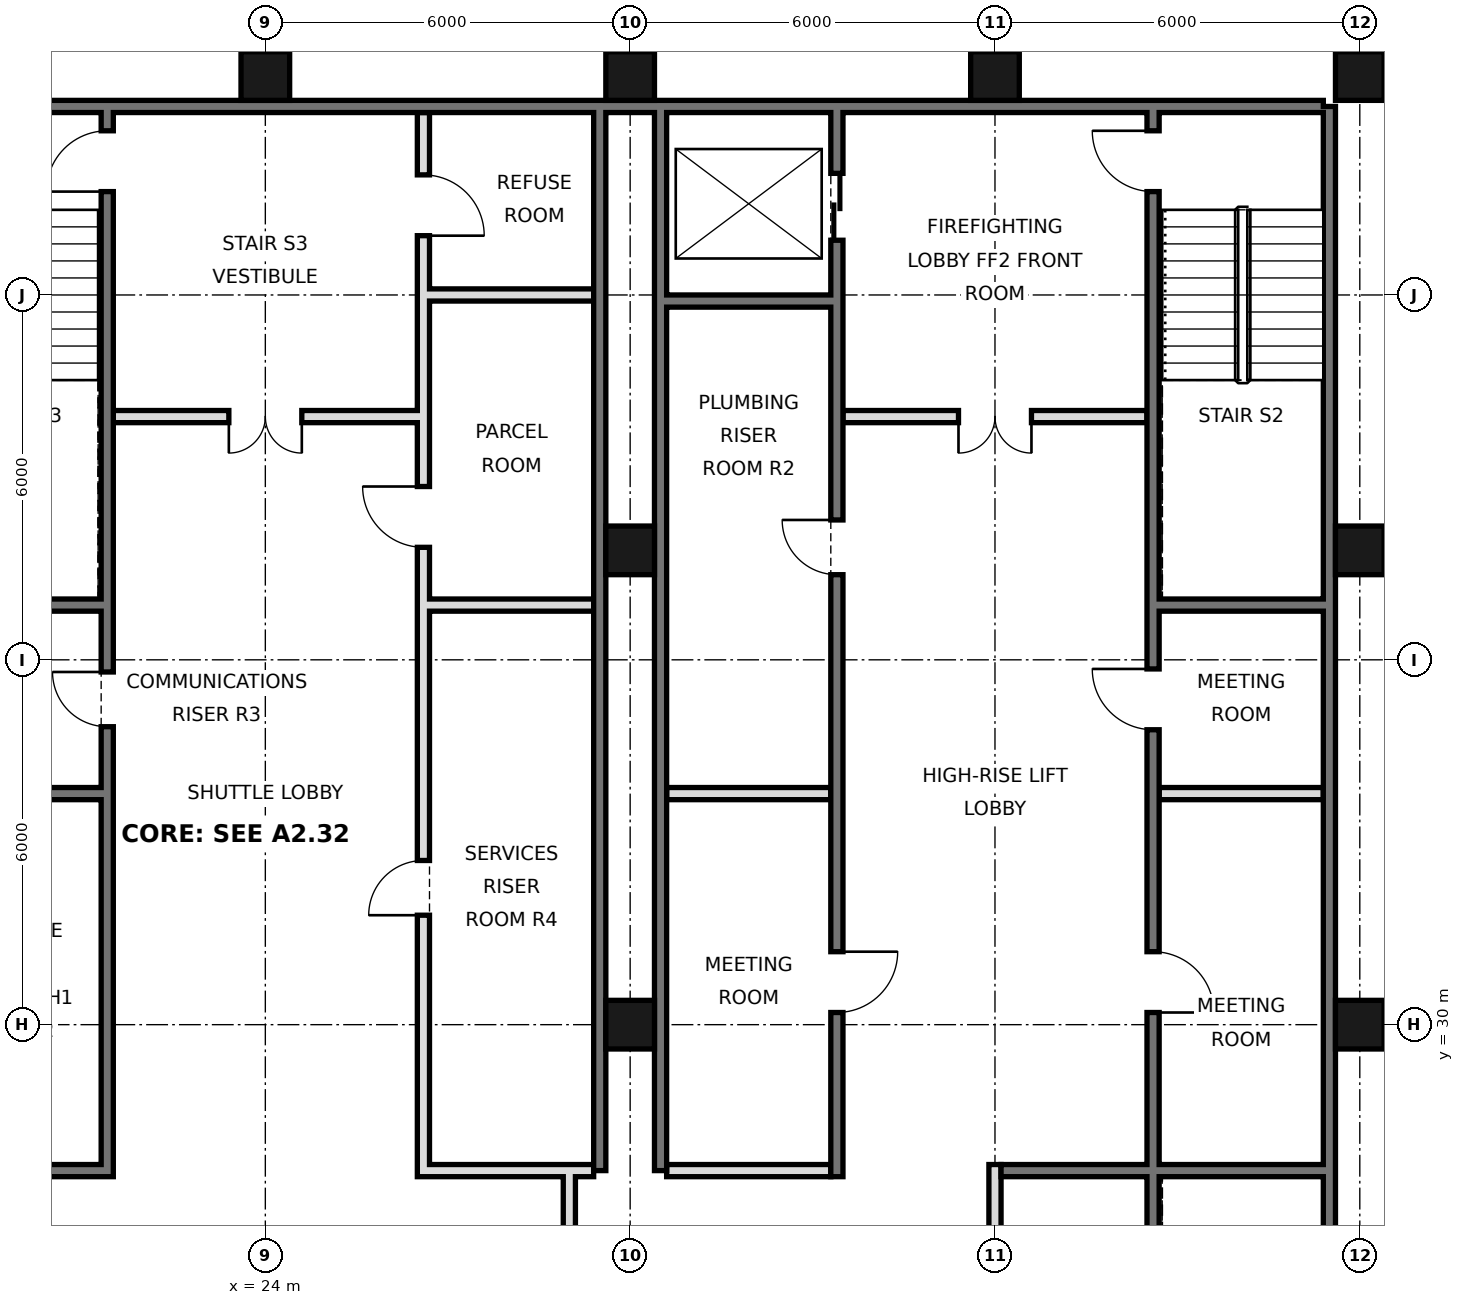
"""IFC4 building model, lengths in metres.
Left out: names, types, materials, properties, quantities, classifications, styles, units other than length and angle.
Written with IfcOpenShell. Run it as: python <this file> out.ifc"""

import sys

from ifc_helpers import new_model, si_unit, direction, frame, frame_2d, origin, origin_2d, place, context, subcontext, project, spatial, rectangle, hollow_rectangle, extrude, element, fill, save


model = new_model("IFC4")
c1 = context("Model", 3, precision=1e-05, world=origin(), true_north=direction((0.0, 1.0)))
c2 = subcontext(c1, "Body", "Model", "MODEL_VIEW")
j1 = project(units=[si_unit("LENGTHUNIT", "METRE"), si_unit("PLANEANGLEUNIT", "RADIAN")], contexts=[c1])
p1 = place(None, origin())
s1 = spatial("IfcSite", under=j1, at=p1, CompositionType="ELEMENT")
p2 = place(p1, origin())
s2 = spatial("IfcBuilding", under=s1, at=p2, CompositionType="ELEMENT")
p3 = place(p2, frame((0.0, 0.0, 126.8)))
s3 = spatial("IfcBuildingStorey", under=s2, at=p3, CompositionType="ELEMENT", Elevation=126.8)
for number, where, z_axis, x_axis in (
    (1, (24.0, 45.6, 0.0), (0.0, 0.0, 1.0), (1.0, 0.0, 0.0)),
    (2, (30.0, 30.0, 0.0), (0.0, 0.0, 1.0), (1.0, 0.0, 0.0)),
    (3, (30.0, 37.8, 0.0), (0.0, 0.0, 1.0), (1.0, 0.0, 0.0)),
    (4, (30.0, 45.6, 0.0), (0.0, 0.0, 1.0), (1.0, 0.0, 0.0)),
    (5, (36.0, 45.6, 0.0), (0.0, 0.0, 1.0), (1.0, 0.0, 0.0)),
    (6, (42.0, 30.0, 0.0), (0.0, 0.0, 1.0), (1.0, 0.0, 0.0)),
    (7, (42.0, 37.8, 0.0), (0.0, 0.0, 1.0), (1.0, 0.0, 0.0)),
    (8, (42.0, 45.6, 0.0), (0.0, 0.0, 1.0), (1.0, 0.0, 0.0)),
):
    element("IfcColumn", number, at=place(p3, frame(where, z_axis=z_axis, x_axis=x_axis)), inside=s3, PredefinedType="COLUMN", context=c2, shape_type="SweptSolid", body=[
        extrude(hollow_rectangle(XDim=0.8, YDim=0.8, WallThickness=0.05, at=origin_2d()), origin(), (0.0, 0.0, 1.0), 3.6),
    ])
p4 = place(p3, frame((41.5, 21.6, 0.0), z_axis=(0.0, 0.0, 1.0), x_axis=(0.0, 1.0, 0.0)))
e9 = element("IfcWall", 9, at=p4, inside=s3, PredefinedType="SOLIDWALL", context=c2, shape_type="SweptSolid", body=[
    extrude(rectangle(XDim=23.5, YDim=0.2, at=frame_2d((11.75, 0.0))), origin(), (0.0, 0.0, 1.0), 3.42),
])
p5 = place(p3, frame((6.6, 45.1, 0.0), z_axis=(0.0, 0.0, 1.0), x_axis=(1.0, 0.0, 0.0)))
e10 = element("IfcWall", 10, at=p5, inside=s3, PredefinedType="SOLIDWALL", context=c2, shape_type="SweptSolid", body=[
    extrude(rectangle(XDim=34.8, YDim=0.2, at=frame_2d((17.4, 0.0))), origin(), (0.0, 0.0, 1.0), 3.42),
])
for number, where, z_axis, x_axis in (
    (11, (29.5, 27.6, 0.0), (0.0, 0.0, 1.0), (0.0, 1.0, 0.0)),
    (12, (30.5, 27.6, 0.0), (0.0, 0.0, 1.0), (0.0, 1.0, 0.0)),
):
    element("IfcWall", number, at=place(p3, frame(where, z_axis=z_axis, x_axis=x_axis)), inside=s3, PredefinedType="SOLIDWALL", context=c2, shape_type="SweptSolid", body=[
        extrude(rectangle(XDim=17.5, YDim=0.2, at=frame_2d((8.75, 0.0))), origin(), (0.0, 0.0, 1.0), 3.42),
    ])
p6 = place(p3, frame((29.0, 21.6, 0.0), z_axis=(0.0, 0.0, 1.0), x_axis=(0.0, 1.0, 0.0)))
e13 = element("IfcWall", 13, at=p6, inside=s3, PredefinedType="PARTITIONING", context=c2, shape_type="SweptSolid", body=[
    extrude(rectangle(XDim=6.0, YDim=0.2, at=frame_2d((3.0, 0.0))), origin(), (0.0, 0.0, 1.0), 3.42),
])
p7 = place(p6, frame((2.1, 0.0, 0.0)))
e14 = element("IfcOpeningElement", 14, at=p7, cuts=e13, PredefinedType="OPENING", context=c2, shape_type="SweptSolid", body=[
    extrude(rectangle(XDim=1.8, YDim=2.1, at=frame_2d((0.9, 1.05))), frame((0.0, 0.11, 0.0), z_axis=(0.0, -1.0, 0.0), x_axis=(1.0, 0.0, 0.0)), (0.0, 0.0, 1.0), 0.22),
])
p8 = place(p3, frame((21.4, 27.5, 0.0), z_axis=(0.0, 0.0, 1.0), x_axis=(0.0, 1.0, 0.0)))
e15 = element("IfcWall", 15, at=p8, inside=s3, PredefinedType="SOLIDWALL", context=c2, shape_type="SweptSolid", body=[
    extrude(rectangle(XDim=17.5, YDim=0.2, at=frame_2d((8.75, 0.0))), origin(), (0.0, 0.0, 1.0), 3.42),
])
p9 = place(p8, frame((16.2, 0.0, 0.0)))
e16 = element("IfcOpeningElement", 16, at=p9, cuts=e15, PredefinedType="OPENING", context=c2, shape_type="SweptSolid", body=[
    extrude(rectangle(XDim=1.0, YDim=2.1, at=frame_2d((0.5, 1.05))), frame((0.0, 0.11, 0.0), z_axis=(0.0, -1.0, 0.0), x_axis=(1.0, 0.0, 0.0)), (0.0, 0.0, 1.0), 0.22),
])
p10 = place(p8, frame((7.4, 0.0, 0.0)))
e17 = element("IfcOpeningElement", 17, at=p10, cuts=e15, PredefinedType="OPENING", context=c2, shape_type="SweptSolid", body=[
    extrude(rectangle(XDim=0.9, YDim=2.1, at=frame_2d((0.45, 1.05))), frame((0.0, 0.11, 0.0), z_axis=(0.0, -1.0, 0.0), x_axis=(1.0, 0.0, 0.0)), (0.0, 0.0, 1.0), 0.22),
])
p11 = place(p3, frame((26.6, 27.5, 0.0), z_axis=(0.0, 0.0, 1.0), x_axis=(0.0, 1.0, 0.0)))
e18 = element("IfcWall", 18, at=p11, inside=s3, PredefinedType="SOLIDWALL", context=c2, shape_type="SweptSolid", body=[
    extrude(rectangle(XDim=17.5, YDim=0.2, at=frame_2d((8.75, 0.0))), origin(), (0.0, 0.0, 1.0), 3.42),
])
p12 = place(p11, frame((4.3, 0.0, 0.0)))
e19 = element("IfcOpeningElement", 19, at=p12, cuts=e18, PredefinedType="OPENING", context=c2, shape_type="SweptSolid", body=[
    extrude(rectangle(XDim=0.9, YDim=2.1, at=frame_2d((0.45, 1.05))), frame((0.0, 0.11, 0.0), z_axis=(0.0, -1.0, 0.0), x_axis=(1.0, 0.0, 0.0)), (0.0, 0.0, 1.0), 0.22),
])
p13 = place(p11, frame((10.35, 0.0, 0.0)))
e20 = element("IfcOpeningElement", 20, at=p13, cuts=e18, PredefinedType="OPENING", context=c2, shape_type="SweptSolid", body=[
    extrude(rectangle(XDim=1.0, YDim=2.1, at=frame_2d((0.5, 1.05))), frame((0.0, 0.11, 0.0), z_axis=(0.0, -1.0, 0.0), x_axis=(1.0, 0.0, 0.0)), (0.0, 0.0, 1.0), 0.22),
])
p14 = place(p11, frame((15.475, 0.0, 0.0)))
e21 = element("IfcOpeningElement", 21, at=p14, cuts=e18, PredefinedType="OPENING", context=c2, shape_type="SweptSolid", body=[
    extrude(rectangle(XDim=1.0, YDim=2.1, at=frame_2d((0.5, 1.05))), frame((0.0, 0.11, 0.0), z_axis=(0.0, -1.0, 0.0), x_axis=(1.0, 0.0, 0.0)), (0.0, 0.0, 1.0), 0.22),
])
p15 = place(p3, frame((33.4, 27.5, 0.0), z_axis=(0.0, 0.0, 1.0), x_axis=(0.0, 1.0, 0.0)))
e22 = element("IfcWall", 22, at=p15, inside=s3, PredefinedType="SOLIDWALL", context=c2, shape_type="SweptSolid", body=[
    extrude(rectangle(XDim=17.5, YDim=0.2, at=frame_2d((8.75, 0.0))), origin(), (0.0, 0.0, 1.0), 3.42),
])
p16 = place(p15, frame((15.4, 0.0, 0.0)))
e23 = element("IfcOpeningElement", 23, at=p16, cuts=e22, PredefinedType="OPENING", context=c2, shape_type="SweptSolid", body=[
    extrude(rectangle(XDim=1.1, YDim=2.1, at=frame_2d((0.55, 1.05))), frame((0.0, 0.11, 0.0), z_axis=(0.0, -1.0, 0.0), x_axis=(1.0, 0.0, 0.0)), (0.0, 0.0, 1.0), 0.22),
])
p17 = place(p15, frame((2.7, 0.0, 0.0)))
e24 = element("IfcOpeningElement", 24, at=p17, cuts=e22, PredefinedType="OPENING", context=c2, shape_type="SweptSolid", body=[
    extrude(rectangle(XDim=1.0, YDim=2.1, at=frame_2d((0.5, 1.05))), frame((0.0, 0.11, 0.0), z_axis=(0.0, -1.0, 0.0), x_axis=(1.0, 0.0, 0.0)), (0.0, 0.0, 1.0), 0.22),
])
p18 = place(p15, frame((9.9, 0.0, 0.0)))
e25 = element("IfcOpeningElement", 25, at=p18, cuts=e22, PredefinedType="OPENING", context=c2, shape_type="SweptSolid", body=[
    extrude(rectangle(XDim=0.9, YDim=2.1, at=frame_2d((0.45, 1.05))), frame((0.0, 0.11, 0.0), z_axis=(0.0, -1.0, 0.0), x_axis=(1.0, 0.0, 0.0)), (0.0, 0.0, 1.0), 0.22),
])
p19 = place(p3, frame((36.0, 21.6, 0.0), z_axis=(0.0, 0.0, 1.0), x_axis=(0.0, 1.0, 0.0)))
e26 = element("IfcWall", 26, at=p19, inside=s3, PredefinedType="PARTITIONING", context=c2, shape_type="SweptSolid", body=[
    extrude(rectangle(XDim=6.1, YDim=0.2, at=frame_2d((3.05, 0.0))), origin(), (0.0, 0.0, 1.0), 3.42),
])
p20 = place(p3, frame((38.6, 21.6, 0.0), z_axis=(0.0, 0.0, 1.0), x_axis=(0.0, 1.0, 0.0)))
e27 = element("IfcWall", 27, at=p20, inside=s3, PredefinedType="SOLIDWALL", context=c2, shape_type="SweptSolid", body=[
    extrude(rectangle(XDim=23.4, YDim=0.2, at=frame_2d((11.7, 0.0))), origin(), (0.0, 0.0, 1.0), 3.42),
])
p21 = place(p20, frame((8.6, 0.0, 0.0)))
e28 = element("IfcOpeningElement", 28, at=p21, cuts=e27, PredefinedType="OPENING", context=c2, shape_type="SweptSolid", body=[
    extrude(rectangle(XDim=1.0, YDim=2.1, at=frame_2d((0.5, 1.05))), frame((0.0, 0.11, 0.0), z_axis=(0.0, -1.0, 0.0), x_axis=(1.0, 0.0, 0.0)), (0.0, 0.0, 1.0), 0.22),
])
p22 = place(p20, frame((13.25, 0.0, 0.0)))
e29 = element("IfcOpeningElement", 29, at=p22, cuts=e27, PredefinedType="OPENING", context=c2, shape_type="SweptSolid", body=[
    extrude(rectangle(XDim=1.0, YDim=2.1, at=frame_2d((0.5, 1.05))), frame((0.0, 0.11, 0.0), z_axis=(0.0, -1.0, 0.0), x_axis=(1.0, 0.0, 0.0)), (0.0, 0.0, 1.0), 0.22),
])
p23 = place(p20, frame((22.1, 0.0, 0.0)))
e30 = element("IfcOpeningElement", 30, at=p23, cuts=e27, PredefinedType="OPENING", context=c2, shape_type="SweptSolid", body=[
    extrude(rectangle(XDim=1.0, YDim=2.1, at=frame_2d((0.5, 1.05))), frame((0.0, 0.11, 0.0), z_axis=(0.0, -1.0, 0.0), x_axis=(1.0, 0.0, 0.0)), (0.0, 0.0, 1.0), 0.22),
])
p24 = place(p20, frame((0.175, 0.0, 0.0)))
e31 = element("IfcOpeningElement", 31, at=p24, cuts=e27, PredefinedType="OPENING", context=c2, shape_type="SweptSolid", body=[
    extrude(rectangle(XDim=0.9, YDim=2.1, at=frame_2d((0.45, 1.05))), frame((0.0, 0.11, 0.0), z_axis=(0.0, -1.0, 0.0), x_axis=(1.0, 0.0, 0.0)), (0.0, 0.0, 1.0), 0.22),
])
for number, where, z_axis, x_axis in (
    (32, (18.6, 27.6, 0.0), (0.0, 0.0, 1.0), (1.0, 0.0, 0.0)),
    (33, (26.7, 27.6, 0.0), (0.0, 0.0, 1.0), (1.0, 0.0, 0.0)),
):
    element("IfcWall", number, at=place(p3, frame(where, z_axis=z_axis, x_axis=x_axis)), inside=s3, PredefinedType="SOLIDWALL", context=c2, shape_type="SweptSolid", body=[
        extrude(rectangle(XDim=2.7, YDim=0.2, at=frame_2d((1.35, 0.0))), origin(), (0.0, 0.0, 1.0), 3.42),
    ])
p25 = place(p3, frame((30.6, 27.6, 0.0), z_axis=(0.0, 0.0, 1.0), x_axis=(1.0, 0.0, 0.0)))
e34 = element("IfcWall", 34, at=p25, inside=s3, PredefinedType="PARTITIONING", context=c2, shape_type="SweptSolid", body=[
    extrude(rectangle(XDim=2.7, YDim=0.2, at=frame_2d((1.35, 0.0))), origin(), (0.0, 0.0, 1.0), 3.42),
])
p26 = place(p3, frame((36.1, 27.6, 0.0), z_axis=(0.0, 0.0, 1.0), x_axis=(1.0, 0.0, 0.0)))
e35 = element("IfcWall", 35, at=p26, inside=s3, PredefinedType="SOLIDWALL", context=c2, shape_type="SweptSolid", body=[
    extrude(rectangle(XDim=5.3, YDim=0.2, at=frame_2d((2.65, 0.0))), origin(), (0.0, 0.0, 1.0), 3.42),
])
for number, where, z_axis, x_axis in (
    (36, (18.6, 33.8, 0.0), (0.0, 0.0, 1.0), (1.0, 0.0, 0.0)),
    (37, (30.6, 33.8, 0.0), (0.0, 0.0, 1.0), (1.0, 0.0, 0.0)),
):
    element("IfcWall", number, at=place(p3, frame(where, z_axis=z_axis, x_axis=x_axis)), inside=s3, PredefinedType="SOLIDWALL", context=c2, shape_type="SweptSolid", body=[
        extrude(rectangle(XDim=2.7, YDim=0.2, at=frame_2d((1.35, 0.0))), origin(), (0.0, 0.0, 1.0), 3.42),
    ])
p27 = place(p3, frame((38.7, 33.8, 0.0), z_axis=(0.0, 0.0, 1.0), x_axis=(1.0, 0.0, 0.0)))
e38 = element("IfcWall", 38, at=p27, inside=s3, PredefinedType="PARTITIONING", context=c2, shape_type="SweptSolid", body=[
    extrude(rectangle(XDim=2.7, YDim=0.2, at=frame_2d((1.35, 0.0))), origin(), (0.0, 0.0, 1.0), 3.42),
])
for number, where, z_axis, x_axis in (
    (39, (18.6, 36.9, 0.0), (0.0, 0.0, 1.0), (1.0, 0.0, 0.0)),
    (40, (26.7, 36.9, 0.0), (0.0, 0.0, 1.0), (1.0, 0.0, 0.0)),
    (41, (38.7, 36.9, 0.0), (0.0, 0.0, 1.0), (1.0, 0.0, 0.0)),
):
    element("IfcWall", number, at=place(p3, frame(where, z_axis=z_axis, x_axis=x_axis)), inside=s3, PredefinedType="SOLIDWALL", context=c2, shape_type="SweptSolid", body=[
        extrude(rectangle(XDim=2.7, YDim=0.2, at=frame_2d((1.35, 0.0))), origin(), (0.0, 0.0, 1.0), 3.42),
    ])
p28 = place(p3, frame((21.5, 40.0, 0.0), z_axis=(0.0, 0.0, 1.0), x_axis=(1.0, 0.0, 0.0)))
e42 = element("IfcWall", 42, at=p28, inside=s3, PredefinedType="PARTITIONING", context=c2, shape_type="SweptSolid", body=[
    extrude(rectangle(XDim=5.0, YDim=0.2, at=frame_2d((2.5, 0.0))), origin(), (0.0, 0.0, 1.0), 3.42),
])
p29 = place(p28, frame((1.9, 0.0, 0.0)))
e43 = element("IfcOpeningElement", 43, at=p29, cuts=e42, PredefinedType="OPENING", context=c2, shape_type="SweptSolid", body=[
    extrude(rectangle(XDim=1.2, YDim=2.1, at=frame_2d((0.6, 1.05))), frame((0.0, 0.11, 0.0), z_axis=(0.0, -1.0, 0.0), x_axis=(1.0, 0.0, 0.0)), (0.0, 0.0, 1.0), 0.22),
])
p30 = place(p3, frame((33.5, 40.0, 0.0), z_axis=(0.0, 0.0, 1.0), x_axis=(1.0, 0.0, 0.0)))
e44 = element("IfcWall", 44, at=p30, inside=s3, PredefinedType="PARTITIONING", context=c2, shape_type="SweptSolid", body=[
    extrude(rectangle(XDim=5.0, YDim=0.2, at=frame_2d((2.5, 0.0))), origin(), (0.0, 0.0, 1.0), 3.42),
])
p31 = place(p30, frame((1.9, 0.0, 0.0)))
e45 = element("IfcOpeningElement", 45, at=p31, cuts=e44, PredefinedType="OPENING", context=c2, shape_type="SweptSolid", body=[
    extrude(rectangle(XDim=1.2, YDim=2.1, at=frame_2d((0.6, 1.05))), frame((0.0, 0.11, 0.0), z_axis=(0.0, -1.0, 0.0), x_axis=(1.0, 0.0, 0.0)), (0.0, 0.0, 1.0), 0.22),
])
p32 = place(p3, frame((30.6, 41.9, 0.0), z_axis=(0.0, 0.0, 1.0), x_axis=(1.0, 0.0, 0.0)))
e46 = element("IfcWall", 46, at=p32, inside=s3, PredefinedType="SOLIDWALL", context=c2, shape_type="SweptSolid", body=[
    extrude(rectangle(XDim=2.7, YDim=0.2, at=frame_2d((1.35, 0.0))), origin(), (0.0, 0.0, 1.0), 3.42),
])
p33 = place(p3, frame((26.7, 42.0, 0.0), z_axis=(0.0, 0.0, 1.0), x_axis=(1.0, 0.0, 0.0)))
e47 = element("IfcWall", 47, at=p33, inside=s3, PredefinedType="PARTITIONING", context=c2, shape_type="SweptSolid", body=[
    extrude(rectangle(XDim=2.7, YDim=0.2, at=frame_2d((1.35, 0.0))), origin(), (0.0, 0.0, 1.0), 3.42),
])
p34 = place(p29, frame((1.2, 0.0, 0.0), z_axis=(0.0, 0.0, 1.0), x_axis=(-1.0, 0.0, 0.0)))
e48 = element("IfcDoor", 48, at=p34, inside=s3, OperationType="DOUBLE_DOOR_SINGLE_SWING", PredefinedType="DOOR", context=c2, shape_type="SweptSolid", body=[
    extrude(rectangle(XDim=1.2, YDim=2.1, at=frame_2d((0.6, 1.05))), frame((0.0, 0.025, 0.0), z_axis=(0.0, -1.0, 0.0), x_axis=(1.0, 0.0, 0.0)), (0.0, 0.0, 1.0), 0.05),
])
fill(e43, e48)
p35 = place(p31, frame((1.2, 0.0, 0.0), z_axis=(0.0, 0.0, 1.0), x_axis=(-1.0, 0.0, 0.0)))
e49 = element("IfcDoor", 49, at=p35, inside=s3, OperationType="DOUBLE_DOOR_SINGLE_SWING", PredefinedType="DOOR", context=c2, shape_type="SweptSolid", body=[
    extrude(rectangle(XDim=1.2, YDim=2.1, at=frame_2d((0.6, 1.05))), frame((0.0, 0.025, 0.0), z_axis=(0.0, -1.0, 0.0), x_axis=(1.0, 0.0, 0.0)), (0.0, 0.0, 1.0), 0.05),
])
fill(e45, e49)
p36 = place(p16, origin())
e50 = element("IfcDoor", 50, at=p36, inside=s3, OperationType="DOUBLE_DOOR_SLIDING", PredefinedType="DOOR", context=c2, shape_type="SweptSolid", body=[
    extrude(rectangle(XDim=1.1, YDim=2.1, at=frame_2d((0.55, 1.05))), frame((0.0, 0.025, 0.0), z_axis=(0.0, -1.0, 0.0), x_axis=(1.0, 0.0, 0.0)), (0.0, 0.0, 1.0), 0.05),
])
fill(e23, e50)
p37 = place(p21, frame((1.0, 0.0, 0.0), z_axis=(0.0, 0.0, 1.0), x_axis=(-1.0, 0.0, 0.0)))
e51 = element("IfcDoor", 51, at=p37, inside=s3, OperationType="SINGLE_SWING_RIGHT", PredefinedType="DOOR", context=c2, shape_type="SweptSolid", body=[
    extrude(rectangle(XDim=1.0, YDim=2.1, at=frame_2d((0.5, 1.05))), frame((0.0, 0.025, 0.0), z_axis=(0.0, -1.0, 0.0), x_axis=(1.0, 0.0, 0.0)), (0.0, 0.0, 1.0), 0.05),
])
fill(e28, e51)
p38 = place(p22, frame((1.0, 0.0, 0.0), z_axis=(0.0, 0.0, 1.0), x_axis=(-1.0, 0.0, 0.0)))
e52 = element("IfcDoor", 52, at=p38, inside=s3, OperationType="SINGLE_SWING_LEFT", PredefinedType="DOOR", context=c2, shape_type="SweptSolid", body=[
    extrude(rectangle(XDim=1.0, YDim=2.1, at=frame_2d((0.5, 1.05))), frame((0.0, 0.025, 0.0), z_axis=(0.0, -1.0, 0.0), x_axis=(1.0, 0.0, 0.0)), (0.0, 0.0, 1.0), 0.05),
])
fill(e29, e52)
p39 = place(p17, origin())
e53 = element("IfcDoor", 53, at=p39, inside=s3, OperationType="SINGLE_SWING_RIGHT", PredefinedType="DOOR", context=c2, shape_type="SweptSolid", body=[
    extrude(rectangle(XDim=1.0, YDim=2.1, at=frame_2d((0.5, 1.05))), frame((0.0, 0.025, 0.0), z_axis=(0.0, -1.0, 0.0), x_axis=(1.0, 0.0, 0.0)), (0.0, 0.0, 1.0), 0.05),
])
fill(e24, e53)
p40 = place(p23, frame((1.0, 0.0, 0.0), z_axis=(0.0, 0.0, 1.0), x_axis=(-1.0, 0.0, 0.0)))
e54 = element("IfcDoor", 54, at=p40, inside=s3, OperationType="SINGLE_SWING_LEFT", PredefinedType="DOOR", context=c2, shape_type="SweptSolid", body=[
    extrude(rectangle(XDim=1.0, YDim=2.1, at=frame_2d((0.5, 1.05))), frame((0.0, 0.025, 0.0), z_axis=(0.0, -1.0, 0.0), x_axis=(1.0, 0.0, 0.0)), (0.0, 0.0, 1.0), 0.05),
])
fill(e30, e54)
p41 = place(p9, origin())
e55 = element("IfcDoor", 55, at=p41, inside=s3, OperationType="SINGLE_SWING_LEFT", PredefinedType="DOOR", context=c2, shape_type="SweptSolid", body=[
    extrude(rectangle(XDim=1.0, YDim=2.1, at=frame_2d((0.5, 1.05))), frame((0.0, 0.025, 0.0), z_axis=(0.0, -1.0, 0.0), x_axis=(1.0, 0.0, 0.0)), (0.0, 0.0, 1.0), 0.05),
])
fill(e16, e55)
p42 = place(p18, frame((0.9, 0.0, 0.0), z_axis=(0.0, 0.0, 1.0), x_axis=(-1.0, 0.0, 0.0)))
e56 = element("IfcDoor", 56, at=p42, inside=s3, OperationType="SINGLE_SWING_LEFT", PredefinedType="DOOR", context=c2, shape_type="SweptSolid", body=[
    extrude(rectangle(XDim=0.9, YDim=2.1, at=frame_2d((0.45, 1.05))), frame((0.0, 0.025, 0.0), z_axis=(0.0, -1.0, 0.0), x_axis=(1.0, 0.0, 0.0)), (0.0, 0.0, 1.0), 0.05),
])
fill(e25, e56)
p43 = place(p10, frame((0.9, 0.0, 0.0), z_axis=(0.0, 0.0, 1.0), x_axis=(-1.0, 0.0, 0.0)))
e57 = element("IfcDoor", 57, at=p43, inside=s3, OperationType="SINGLE_SWING_LEFT", PredefinedType="DOOR", context=c2, shape_type="SweptSolid", body=[
    extrude(rectangle(XDim=0.9, YDim=2.1, at=frame_2d((0.45, 1.05))), frame((0.0, 0.025, 0.0), z_axis=(0.0, -1.0, 0.0), x_axis=(1.0, 0.0, 0.0)), (0.0, 0.0, 1.0), 0.05),
])
fill(e17, e57)
p44 = place(p12, origin())
e58 = element("IfcDoor", 58, at=p44, inside=s3, OperationType="SINGLE_SWING_LEFT", PredefinedType="DOOR", context=c2, shape_type="SweptSolid", body=[
    extrude(rectangle(XDim=0.9, YDim=2.1, at=frame_2d((0.45, 1.05))), frame((0.0, 0.025, 0.0), z_axis=(0.0, -1.0, 0.0), x_axis=(1.0, 0.0, 0.0)), (0.0, 0.0, 1.0), 0.05),
])
fill(e19, e58)
p45 = place(p13, frame((1.0, 0.0, 0.0), z_axis=(0.0, 0.0, 1.0), x_axis=(-1.0, 0.0, 0.0)))
e59 = element("IfcDoor", 59, at=p45, inside=s3, OperationType="SINGLE_SWING_LEFT", PredefinedType="DOOR", context=c2, shape_type="SweptSolid", body=[
    extrude(rectangle(XDim=1.0, YDim=2.1, at=frame_2d((0.5, 1.05))), frame((0.0, 0.025, 0.0), z_axis=(0.0, -1.0, 0.0), x_axis=(1.0, 0.0, 0.0)), (0.0, 0.0, 1.0), 0.05),
])
fill(e20, e59)
p46 = place(p14, frame((1.0, 0.0, 0.0), z_axis=(0.0, 0.0, 1.0), x_axis=(-1.0, 0.0, 0.0)))
e60 = element("IfcDoor", 60, at=p46, inside=s3, OperationType="SINGLE_SWING_RIGHT", PredefinedType="DOOR", context=c2, shape_type="SweptSolid", body=[
    extrude(rectangle(XDim=1.0, YDim=2.1, at=frame_2d((0.5, 1.05))), frame((0.0, 0.025, 0.0), z_axis=(0.0, -1.0, 0.0), x_axis=(1.0, 0.0, 0.0)), (0.0, 0.0, 1.0), 0.05),
])
fill(e21, e60)
save(model, sys.argv[1])
